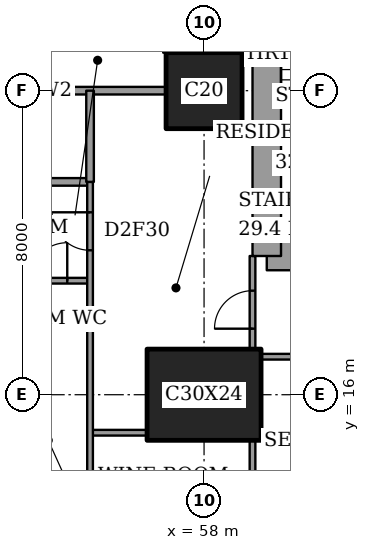
"""IFC4 building model, lengths in metres.
Left out: names, types, materials, properties, quantities, classifications, styles, units other than length and angle.
Written with IfcOpenShell. Run it as: python <this file> out.ifc"""

import sys

from ifc_helpers import new_model, si_unit, direction, frame, frame_2d, origin, origin_2d, place, context, subcontext, project, spatial, rectangle, extrude, element, fill, save


model = new_model("IFC4")
c1 = context("Model", 3, precision=1e-05, world=origin(), true_north=direction((0.0, 1.0)))
c2 = subcontext(c1, "Body", "Model", "MODEL_VIEW")
j1 = project(units=[si_unit("LENGTHUNIT", "METRE"), si_unit("PLANEANGLEUNIT", "RADIAN")], contexts=[c1])
p1 = place(None, origin())
s1 = spatial("IfcSite", under=j1, at=p1, CompositionType="ELEMENT")
p2 = place(p1, origin())
s2 = spatial("IfcBuilding", under=s1, at=p2, CompositionType="ELEMENT")
p3 = place(p2, frame((0.0, 0.0, 146.6)))
s3 = spatial("IfcBuildingStorey", under=s2, at=p3, CompositionType="ELEMENT", Elevation=146.6)
p4 = place(p3, frame((58.0, 16.0, 0.0), z_axis=(0.0, 0.0, 1.0), x_axis=(1.0, 0.0, 0.0)))
e1 = element("IfcColumn", 1, at=p4, inside=s3, PredefinedType="COLUMN", context=c2, shape_type="SweptSolid", body=[
    extrude(rectangle(XDim=3.0, YDim=2.4, at=origin_2d()), origin(), (0.0, 0.0, 1.0), 3.6),
])
p5 = place(p3, frame((58.0, 24.0, 0.0), z_axis=(0.0, 0.0, 1.0), x_axis=(1.0, 0.0, 0.0)))
e2 = element("IfcColumn", 2, at=p5, inside=s3, PredefinedType="COLUMN", context=c2, shape_type="SweptSolid", body=[
    extrude(rectangle(XDim=2.0, YDim=2.0, at=origin_2d()), origin(), (0.0, 0.0, 1.0), 3.6),
])
p6 = place(p3, frame((59.65, 19.65, 0.0), z_axis=(0.0, 0.0, 1.0), x_axis=(1.0, 0.0, 0.0)))
e3 = element("IfcWall", 3, at=p6, inside=s3, PredefinedType="SHEAR", context=c2, shape_type="SweptSolid", body=[
    extrude(rectangle(XDim=4.45, YDim=0.75, at=frame_2d((2.225, 0.0))), origin(), (0.0, 0.0, 1.0), 3.6),
])
p7 = place(p3, frame((59.65, 28.35, 0.0), z_axis=(0.0, 0.0, 1.0), x_axis=(0.0, -1.0, 0.0)))
e4 = element("IfcWall", 4, at=p7, inside=s3, PredefinedType="SHEAR", context=c2, shape_type="SweptSolid", body=[
    extrude(rectangle(XDim=8.7, YDim=0.75, at=frame_2d((4.35, 0.0))), origin(), (0.0, 0.0, 1.0), 3.6),
])
p8 = place(p7, frame((0.975, 0.0, 0.0)))
e5 = element("IfcOpeningElement", 5, at=p8, cuts=e4, PredefinedType="OPENING", context=c2, shape_type="SweptSolid", body=[
    extrude(rectangle(XDim=1.0, YDim=2.1, at=frame_2d((0.5, 1.05))), frame((0.0, 0.385, 0.0), z_axis=(0.0, -1.0, 0.0), x_axis=(1.0, 0.0, 0.0)), (0.0, 0.0, 1.0), 0.77),
])
p9 = place(p3, frame((55.0, 15.0, 0.0), z_axis=(0.0, 0.0, 1.0), x_axis=(1.0, 0.0, 0.0)))
e6 = element("IfcWall", 6, at=p9, inside=s3, PredefinedType="PARTITIONING", context=c2, shape_type="SweptSolid", body=[
    extrude(rectangle(XDim=1.5, YDim=0.15, at=frame_2d((0.75, 0.0))), origin(), (0.0, 0.0, 1.0), 3.35),
])
p10 = place(p3, frame((59.5, 17.0, 0.0), z_axis=(0.0, 0.0, 1.0), x_axis=(1.0, 0.0, 0.0)))
e7 = element("IfcWall", 7, at=p10, inside=s3, PredefinedType="PARTITIONING", context=c2, shape_type="SweptSolid", body=[
    extrude(rectangle(XDim=5.15, YDim=0.15, at=frame_2d((2.575, 0.0))), origin(), (0.0, 0.0, 1.0), 3.35),
])
p11 = place(p3, frame((51.6, 19.0, 0.0), z_axis=(0.0, 0.0, 1.0), x_axis=(1.0, 0.0, 0.0)))
e8 = element("IfcWall", 8, at=p11, inside=s3, PredefinedType="PARTITIONING", context=c2, shape_type="SweptSolid", body=[
    extrude(rectangle(XDim=3.4, YDim=0.15, at=frame_2d((1.7, 0.0))), origin(), (0.0, 0.0, 1.0), 3.35),
])
p12 = place(p11, frame((1.8, 0.0, 0.0)))
e9 = element("IfcOpeningElement", 9, at=p12, cuts=e8, PredefinedType="OPENING", context=c2, shape_type="SweptSolid", body=[
    extrude(rectangle(XDim=1.0, YDim=2.1, at=frame_2d((0.5, 1.05))), frame((0.0, 0.085, 0.0), z_axis=(0.0, -1.0, 0.0), x_axis=(1.0, 0.0, 0.0)), (0.0, 0.0, 1.0), 0.17),
])
p13 = place(p3, frame((51.2, 21.6, 0.0), z_axis=(0.0, 0.0, 1.0), x_axis=(1.0, 0.0, 0.0)))
e10 = element("IfcWall", 10, at=p13, inside=s3, PredefinedType="PARTITIONING", context=c2, shape_type="SweptSolid", body=[
    extrude(rectangle(XDim=3.8, YDim=0.2, at=frame_2d((1.9, 0.0))), origin(), (0.0, 0.0, 1.0), 3.35),
])
p14 = place(p13, frame((1.45, 0.0, 0.0)))
e11 = element("IfcOpeningElement", 11, at=p14, cuts=e10, PredefinedType="OPENING", context=c2, shape_type="SweptSolid", body=[
    extrude(rectangle(XDim=0.9, YDim=2.1, at=frame_2d((0.45, 1.05))), frame((0.0, 0.11, 0.0), z_axis=(0.0, -1.0, 0.0), x_axis=(1.0, 0.0, 0.0)), (0.0, 0.0, 1.0), 0.22),
])
p15 = place(p3, frame((51.0, 24.0, 0.0), z_axis=(0.0, 0.0, 1.0), x_axis=(1.0, 0.0, 0.0)))
e12 = element("IfcWall", 12, at=p15, inside=s3, PredefinedType="PARTITIONING", context=c2, shape_type="SweptSolid", body=[
    extrude(rectangle(XDim=6.0, YDim=0.2, at=frame_2d((3.0, 0.0))), origin(), (0.0, 0.0, 1.0), 3.35),
])
p16 = place(p3, frame((55.0, 21.6, 0.0), z_axis=(0.0, 0.0, 1.0), x_axis=(0.0, 1.0, 0.0)))
e13 = element("IfcWall", 13, at=p16, inside=s3, PredefinedType="PARTITIONING", context=c2, shape_type="SweptSolid", body=[
    extrude(rectangle(XDim=2.4, YDim=0.2, at=frame_2d((1.2, 0.0))), origin(), (0.0, 0.0, 1.0), 3.35),
])
p17 = place(p3, frame((55.0, 10.6, 0.0), z_axis=(0.0, 0.0, 1.0), x_axis=(0.0, 1.0, 0.0)))
e14 = element("IfcWall", 14, at=p17, inside=s3, PredefinedType="PARTITIONING", context=c2, shape_type="SweptSolid", body=[
    extrude(rectangle(XDim=11.0, YDim=0.15, at=frame_2d((5.5, 0.0))), origin(), (0.0, 0.0, 1.0), 3.35),
])
p18 = place(p17, frame((9.2, 0.0, 0.0)))
e15 = element("IfcOpeningElement", 15, at=p18, cuts=e14, PredefinedType="OPENING", context=c2, shape_type="SweptSolid", body=[
    extrude(rectangle(XDim=1.0, YDim=2.1, at=frame_2d((0.5, 1.05))), frame((0.0, 0.085, 0.0), z_axis=(0.0, -1.0, 0.0), x_axis=(1.0, 0.0, 0.0)), (0.0, 0.0, 1.0), 0.17),
])
p19 = place(p3, frame((59.275, 10.6, 0.0), z_axis=(0.0, 0.0, 1.0), x_axis=(0.0, 1.0, 0.0)))
e16 = element("IfcWall", 16, at=p19, inside=s3, PredefinedType="PARTITIONING", context=c2, shape_type="SweptSolid", body=[
    extrude(rectangle(XDim=4.2, YDim=0.15, at=frame_2d((2.1, 0.0))), origin(), (0.0, 0.0, 1.0), 3.35),
])
p20 = place(p3, frame((59.275, 17.2, 0.0), z_axis=(0.0, 0.0, 1.0), x_axis=(0.0, 1.0, 0.0)))
e17 = element("IfcWall", 17, at=p20, inside=s3, PredefinedType="PARTITIONING", context=c2, shape_type="SweptSolid", body=[
    extrude(rectangle(XDim=2.45, YDim=0.15, at=frame_2d((1.225, 0.0))), origin(), (0.0, 0.0, 1.0), 3.35),
])
p21 = place(p20, frame((0.538, 0.0, 0.0)))
e18 = element("IfcOpeningElement", 18, at=p21, cuts=e17, PredefinedType="OPENING", context=c2, shape_type="SweptSolid", body=[
    extrude(rectangle(XDim=1.0, YDim=2.1, at=frame_2d((0.5, 1.05))), frame((0.0, 0.085, 0.0), z_axis=(0.0, -1.0, 0.0), x_axis=(1.0, 0.0, 0.0)), (0.0, 0.0, 1.0), 0.17),
])
p22 = place(p21, origin())
e19 = element("IfcDoor", 19, at=p22, inside=s3, OperationType="SINGLE_SWING_RIGHT", PredefinedType="DOOR", context=c2, shape_type="SweptSolid", body=[
    extrude(rectangle(XDim=1.0, YDim=2.1, at=frame_2d((0.5, 1.05))), frame((0.0, 0.025, 0.0), z_axis=(0.0, -1.0, 0.0), x_axis=(1.0, 0.0, 0.0)), (0.0, 0.0, 1.0), 0.05),
])
fill(e18, e19)
p23 = place(p18, origin())
e20 = element("IfcDoor", 20, at=p23, inside=s3, OperationType="SINGLE_SWING_LEFT", PredefinedType="DOOR", context=c2, shape_type="SweptSolid", body=[
    extrude(rectangle(XDim=1.0, YDim=2.1, at=frame_2d((0.5, 1.05))), frame((0.0, 0.025, 0.0), z_axis=(0.0, -1.0, 0.0), x_axis=(1.0, 0.0, 0.0)), (0.0, 0.0, 1.0), 0.05),
])
fill(e15, e20)
p24 = place(p12, origin())
e21 = element("IfcDoor", 21, at=p24, inside=s3, OperationType="SINGLE_SWING_LEFT", PredefinedType="DOOR", context=c2, shape_type="SweptSolid", body=[
    extrude(rectangle(XDim=1.0, YDim=2.1, at=frame_2d((0.5, 1.05))), frame((0.0, 0.025, 0.0), z_axis=(0.0, -1.0, 0.0), x_axis=(1.0, 0.0, 0.0)), (0.0, 0.0, 1.0), 0.05),
])
fill(e9, e21)
save(model, sys.argv[1])
